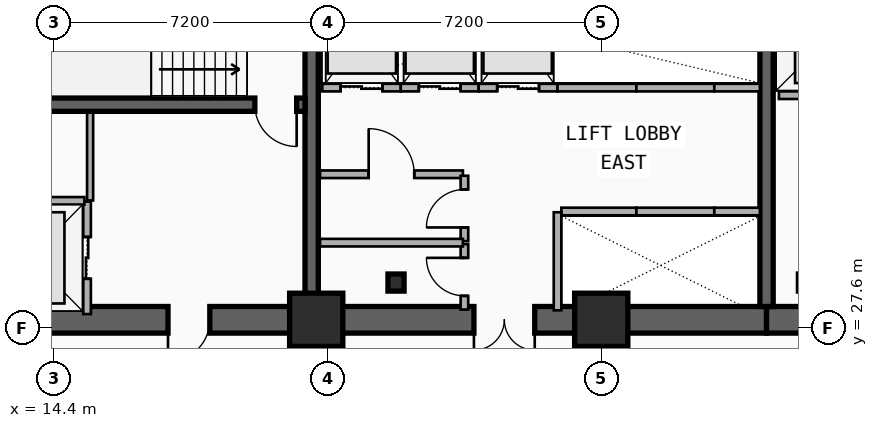
"""IFC4 building model, lengths in metres.
Left out: names, types, materials, properties, quantities, classifications, styles, units other than length and angle.
Written with IfcOpenShell. Run it as: python <this file> out.ifc"""

import sys

from ifc_helpers import new_model, si_unit, direction, frame, frame_2d, origin, origin_2d, place, context, subcontext, project, spatial, rectangle, i_section, extrude, element, fill, save


model = new_model("IFC4")
c1 = context("Model", 3, precision=1e-05, world=origin(), true_north=direction((0.0, 1.0)))
c2 = subcontext(c1, "Body", "Model", "MODEL_VIEW")
j1 = project(units=[si_unit("LENGTHUNIT", "METRE"), si_unit("PLANEANGLEUNIT", "RADIAN")], contexts=[c1])
p1 = place(None, origin())
s1 = spatial("IfcSite", under=j1, at=p1, CompositionType="ELEMENT")
p2 = place(p1, origin())
s2 = spatial("IfcBuilding", under=s1, at=p2, CompositionType="ELEMENT")
p3 = place(p2, frame((0.0, 0.0, 46.5)))
s3 = spatial("IfcBuildingStorey", under=s2, at=p3, CompositionType="ELEMENT", Elevation=46.5)
p4 = place(p3, frame((21.18, 27.82, 0.0), z_axis=(0.0, 0.0, 1.0), x_axis=(-1.0, 0.0, 0.0)))
e1 = element("IfcWall", 1, at=p4, inside=s3, PredefinedType="SHEAR", context=c2, shape_type="SweptSolid", body=[
    extrude(rectangle(XDim=9.03, YDim=0.7, at=frame_2d((4.515, 0.0))), origin(), (0.0, 0.0, 1.0), 3.5),
])
p5 = place(p4, frame((2.68, 0.0, 0.0)))
e2 = element("IfcOpeningElement", 2, at=p5, cuts=e1, PredefinedType="OPENING", context=c2, shape_type="SweptSolid", body=[
    extrude(rectangle(XDim=1.1, YDim=2.15, at=frame_2d((0.55, 1.075))), frame((0.0, 0.36, 0.0), z_axis=(0.0, -1.0, 0.0), x_axis=(1.0, 0.0, 0.0)), (0.0, 0.0, 1.0), 0.72),
])
p6 = place(p3, frame((33.15, 27.82, 0.0), z_axis=(0.0, 0.0, 1.0), x_axis=(-1.0, 0.0, 0.0)))
e3 = element("IfcWall", 3, at=p6, inside=s3, PredefinedType="SHEAR", context=c2, shape_type="SweptSolid", body=[
    extrude(rectangle(XDim=11.97, YDim=0.7, at=frame_2d((5.985, 0.0))), origin(), (0.0, 0.0, 1.0), 3.5),
])
p7 = place(p6, frame((6.1, 0.0, 0.0)))
e4 = element("IfcOpeningElement", 4, at=p7, cuts=e3, PredefinedType="OPENING", context=c2, shape_type="SweptSolid", body=[
    extrude(rectangle(XDim=1.6, YDim=2.2, at=frame_2d((0.8, 1.1))), frame((0.0, 0.36, 0.0), z_axis=(0.0, -1.0, 0.0), x_axis=(1.0, 0.0, 0.0)), (0.0, 0.0, 1.0), 0.72),
])
p8 = place(p3, frame((45.38, 27.82, 0.0), z_axis=(0.0, 0.0, 1.0), x_axis=(-1.0, 0.0, 0.0)))
e5 = element("IfcWall", 5, at=p8, inside=s3, PredefinedType="SHEAR", context=c2, shape_type="SweptSolid", body=[
    extrude(rectangle(XDim=12.23, YDim=0.7, at=frame_2d((6.115, 0.0))), origin(), (0.0, 0.0, 1.0), 3.5),
])
p9 = place(p8, frame((9.93, 0.0, 0.0)))
e6 = element("IfcOpeningElement", 6, at=p9, cuts=e5, PredefinedType="OPENING", context=c2, shape_type="SweptSolid", body=[
    extrude(rectangle(XDim=1.1, YDim=2.15, at=frame_2d((0.55, 1.075))), frame((0.0, 0.36, 0.0), z_axis=(0.0, -1.0, 0.0), x_axis=(1.0, 0.0, 0.0)), (0.0, 0.0, 1.0), 0.72),
])
p10 = place(p8, frame((6.23, 0.0, 0.0)))
e7 = element("IfcOpeningElement", 7, at=p10, cuts=e5, PredefinedType="OPENING", context=c2, shape_type="SweptSolid", body=[
    extrude(rectangle(XDim=1.1, YDim=2.15, at=frame_2d((0.55, 1.075))), frame((0.0, 0.36, 0.0), z_axis=(0.0, -1.0, 0.0), x_axis=(1.0, 0.0, 0.0)), (0.0, 0.0, 1.0), 0.72),
])
for number, where, z_axis, x_axis in (
    (8, (21.18, 28.17, 0.0), (0.0, 0.0, 1.0), (0.0, 1.0, 0.0)),
    (9, (33.15, 28.17, 0.0), (0.0, 0.0, 1.0), (0.0, 1.0, 0.0)),
):
    element("IfcWall", number, at=place(p3, frame(where, z_axis=z_axis, x_axis=x_axis)), inside=s3, PredefinedType="SHEAR", context=c2, shape_type="SweptSolid", body=[
        extrude(rectangle(XDim=8.53, YDim=0.35, at=frame_2d((4.265, 0.0))), origin(), (0.0, 0.0, 1.0), 3.5),
    ])
p11 = place(p3, frame((21.005, 33.48, 0.0), z_axis=(0.0, 0.0, 1.0), x_axis=(-1.0, 0.0, 0.0)))
e10 = element("IfcWall", 10, at=p11, inside=s3, PredefinedType="SHEAR", context=c2, shape_type="SweptSolid", body=[
    extrude(rectangle(XDim=8.505, YDim=0.35, at=frame_2d((4.252, 0.0))), origin(), (0.0, 0.0, 1.0), 3.5),
])
p12 = place(p11, frame((0.22, 0.0, 0.0)))
e11 = element("IfcOpeningElement", 11, at=p12, cuts=e10, PredefinedType="OPENING", context=c2, shape_type="SweptSolid", body=[
    extrude(rectangle(XDim=1.1, YDim=2.15, at=frame_2d((0.55, 1.075))), frame((0.0, 0.185, 0.0), z_axis=(0.0, -1.0, 0.0), x_axis=(1.0, 0.0, 0.0)), (0.0, 0.0, 1.0), 0.37),
])
p13 = place(p3, frame((23.4, 28.8, 0.0), z_axis=(0.0, 0.0, 1.0), x_axis=(1.0, 0.0, 0.0)))
e12 = element("IfcColumn", 12, at=p13, inside=s3, PredefinedType="COLUMN", context=c2, shape_type="SweptSolid", body=[
    extrude(i_section(OverallWidth=0.424, OverallDepth=0.45, WebThickness=0.041, FlangeThickness=0.065, FilletRadius=0.015, at=origin_2d()), origin(), (0.0, 0.0, 1.0), 3.5),
])
for number, where, z_axis, x_axis in (
    (13, (21.3, 27.82, 0.0), (0.0, 0.0, 1.0), (1.0, 0.0, 0.0)),
    (14, (28.8, 27.82, 0.0), (0.0, 0.0, 1.0), (1.0, 0.0, 0.0)),
):
    element("IfcColumn", number, at=place(p3, frame(where, z_axis=z_axis, x_axis=x_axis)), inside=s3, PredefinedType="COLUMN", context=c2, shape_type="SweptSolid", body=[
        extrude(rectangle(XDim=1.4, YDim=1.4, at=origin_2d()), origin(), (0.0, 0.0, 1.0), 3.5),
    ])
p14 = place(p3, frame((15.27, 27.97, 0.0), z_axis=(0.0, 0.0, 1.0), x_axis=(0.0, 1.0, 0.0)))
e15 = element("IfcWall", 15, at=p14, inside=s3, PredefinedType="PARTITIONING", context=c2, shape_type="SweptSolid", body=[
    extrude(rectangle(XDim=2.96, YDim=0.2, at=frame_2d((1.48, 0.0))), origin(), (0.0, 0.0, 1.0), 2.212),
])
p15 = place(p14, frame((0.93, 0.0, 0.0)))
e16 = element("IfcOpeningElement", 16, at=p15, cuts=e15, PredefinedType="OPENING", context=c2, shape_type="SweptSolid", body=[
    extrude(rectangle(XDim=1.1, YDim=2.15, at=frame_2d((0.55, 1.075))), frame((0.0, 0.11, 0.0), z_axis=(0.0, -1.0, 0.0), x_axis=(1.0, 0.0, 0.0)), (0.0, 0.0, 1.0), 0.22),
])
p16 = place(p3, frame((12.45, 30.95, 0.0), z_axis=(0.0, 0.0, 1.0), x_axis=(1.0, 0.0, 0.0)))
e17 = element("IfcWall", 17, at=p16, inside=s3, PredefinedType="PARTITIONING", context=c2, shape_type="SweptSolid", body=[
    extrude(rectangle(XDim=2.75, YDim=0.2, at=frame_2d((1.375, 0.0))), origin(), (0.0, 0.0, 1.0), 2.212),
])
p17 = place(p3, frame((33.475, 33.73, 0.0), z_axis=(0.0, 0.0, 1.0), x_axis=(1.0, 0.0, 0.0)))
e18 = element("IfcWall", 18, at=p17, inside=s3, PredefinedType="PARTITIONING", context=c2, shape_type="SweptSolid", body=[
    extrude(rectangle(XDim=2.725, YDim=0.2, at=frame_2d((1.362, 0.0))), origin(), (0.0, 0.0, 1.0), 2.212),
])
p18 = place(p17, frame((0.812, 0.0, 0.0)))
e19 = element("IfcOpeningElement", 19, at=p18, cuts=e18, PredefinedType="OPENING", context=c2, shape_type="SweptSolid", body=[
    extrude(rectangle(XDim=1.1, YDim=2.15, at=frame_2d((0.55, 1.075))), frame((0.0, 0.11, 0.0), z_axis=(0.0, -1.0, 0.0), x_axis=(1.0, 0.0, 0.0)), (0.0, 0.0, 1.0), 0.22),
])
p19 = place(p3, frame((27.75, 30.67, 0.0), z_axis=(0.0, 0.0, 1.0), x_axis=(1.0, 0.0, 0.0)))
e20 = element("IfcWall", 20, at=p19, inside=s3, PredefinedType="PARTITIONING", context=c2, shape_type="SweptSolid", body=[
    extrude(rectangle(XDim=1.975, YDim=0.2, at=frame_2d((0.988, 0.0))), origin(), (0.0, 0.0, 1.0), 2.212),
])
p20 = place(p3, frame((27.65, 28.07, 0.0), z_axis=(0.0, 0.0, 1.0), x_axis=(0.0, 1.0, 0.0)))
e21 = element("IfcWall", 21, at=p20, inside=s3, PredefinedType="PARTITIONING", context=c2, shape_type="SweptSolid", body=[
    extrude(rectangle(XDim=2.58, YDim=0.2, at=frame_2d((1.29, 0.0))), origin(), (0.0, 0.0, 1.0), 2.212),
])
p21 = place(p3, frame((29.725, 30.67, 0.0), z_axis=(0.0, 0.0, 1.0), x_axis=(1.0, 0.0, 0.0)))
e22 = element("IfcWall", 22, at=p21, inside=s3, PredefinedType="PARTITIONING", context=c2, shape_type="SweptSolid", body=[
    extrude(rectangle(XDim=2.05, YDim=0.2, at=frame_2d((1.025, 0.0))), origin(), (0.0, 0.0, 1.0), 2.62),
])
p22 = place(p3, frame((31.775, 30.67, 0.0), z_axis=(0.0, 0.0, 1.0), x_axis=(1.0, 0.0, 0.0)))
e23 = element("IfcWall", 23, at=p22, inside=s3, PredefinedType="PARTITIONING", context=c2, shape_type="SweptSolid", body=[
    extrude(rectangle(XDim=1.2, YDim=0.2, at=frame_2d((0.6, 0.0))), origin(), (0.0, 0.0, 1.0), 2.62),
])
p23 = place(p3, frame((21.46, 33.93, 0.0), z_axis=(0.0, 0.0, 1.0), x_axis=(1.0, 0.0, 0.0)))
e24 = element("IfcWall", 24, at=p23, inside=s3, PredefinedType="PARTITIONING", context=c2, shape_type="SweptSolid", body=[
    extrude(rectangle(XDim=2.065, YDim=0.2, at=frame_2d((1.032, 0.0))), origin(), (0.0, 0.0, 1.0), 2.212),
])
p24 = place(p23, frame((0.482, 0.0, 0.0)))
e25 = element("IfcOpeningElement", 25, at=p24, cuts=e24, PredefinedType="OPENING", context=c2, shape_type="SweptSolid", body=[
    extrude(rectangle(XDim=1.1, YDim=2.15, at=frame_2d((0.55, 1.075))), frame((0.0, 0.11, 0.0), z_axis=(0.0, -1.0, 0.0), x_axis=(1.0, 0.0, 0.0)), (0.0, 0.0, 1.0), 0.22),
])
p25 = place(p3, frame((23.525, 33.93, 0.0), z_axis=(0.0, 0.0, 1.0), x_axis=(1.0, 0.0, 0.0)))
e26 = element("IfcWall", 26, at=p25, inside=s3, PredefinedType="PARTITIONING", context=c2, shape_type="SweptSolid", body=[
    extrude(rectangle(XDim=2.05, YDim=0.2, at=frame_2d((1.025, 0.0))), origin(), (0.0, 0.0, 1.0), 3.24),
])
p26 = place(p25, frame((0.475, 0.0, 0.0)))
e27 = element("IfcOpeningElement", 27, at=p26, cuts=e26, PredefinedType="OPENING", context=c2, shape_type="SweptSolid", body=[
    extrude(rectangle(XDim=1.1, YDim=2.15, at=frame_2d((0.55, 1.075))), frame((0.0, 0.11, 0.0), z_axis=(0.0, -1.0, 0.0), x_axis=(1.0, 0.0, 0.0)), (0.0, 0.0, 1.0), 0.22),
])
p27 = place(p3, frame((25.575, 33.93, 0.0), z_axis=(0.0, 0.0, 1.0), x_axis=(1.0, 0.0, 0.0)))
e28 = element("IfcWall", 28, at=p27, inside=s3, PredefinedType="PARTITIONING", context=c2, shape_type="SweptSolid", body=[
    extrude(rectangle(XDim=2.075, YDim=0.2, at=frame_2d((1.038, 0.0))), origin(), (0.0, 0.0, 1.0), 3.24),
])
p28 = place(p27, frame((0.488, 0.0, 0.0)))
e29 = element("IfcOpeningElement", 29, at=p28, cuts=e28, PredefinedType="OPENING", context=c2, shape_type="SweptSolid", body=[
    extrude(rectangle(XDim=1.1, YDim=2.15, at=frame_2d((0.55, 1.075))), frame((0.0, 0.11, 0.0), z_axis=(0.0, -1.0, 0.0), x_axis=(1.0, 0.0, 0.0)), (0.0, 0.0, 1.0), 0.22),
])
p29 = place(p3, frame((27.65, 33.93, 0.0), z_axis=(0.0, 0.0, 1.0), x_axis=(1.0, 0.0, 0.0)))
e30 = element("IfcWall", 30, at=p29, inside=s3, PredefinedType="PARTITIONING", context=c2, shape_type="SweptSolid", body=[
    extrude(rectangle(XDim=2.075, YDim=0.2, at=frame_2d((1.038, 0.0))), origin(), (0.0, 0.0, 1.0), 2.212),
])
p30 = place(p3, frame((29.725, 33.93, 0.0), z_axis=(0.0, 0.0, 1.0), x_axis=(1.0, 0.0, 0.0)))
e31 = element("IfcWall", 31, at=p30, inside=s3, PredefinedType="PARTITIONING", context=c2, shape_type="SweptSolid", body=[
    extrude(rectangle(XDim=2.05, YDim=0.2, at=frame_2d((1.025, 0.0))), origin(), (0.0, 0.0, 1.0), 3.24),
])
p31 = place(p3, frame((31.775, 33.93, 0.0), z_axis=(0.0, 0.0, 1.0), x_axis=(1.0, 0.0, 0.0)))
e32 = element("IfcWall", 32, at=p31, inside=s3, PredefinedType="PARTITIONING", context=c2, shape_type="SweptSolid", body=[
    extrude(rectangle(XDim=1.2, YDim=0.2, at=frame_2d((0.6, 0.0))), origin(), (0.0, 0.0, 1.0), 3.24),
])
p32 = place(p3, frame((21.4, 31.65, 0.0), z_axis=(0.0, 0.0, 1.0), x_axis=(1.0, 0.0, 0.0)))
e33 = element("IfcWall", 33, at=p32, inside=s3, PredefinedType="PARTITIONING", context=c2, shape_type="SweptSolid", body=[
    extrude(rectangle(XDim=3.76, YDim=0.2, at=frame_2d((1.88, 0.0))), origin(), (0.0, 0.0, 1.0), 2.28),
])
p33 = place(p32, frame((1.28, 0.0, 0.0)))
e34 = element("IfcOpeningElement", 34, at=p33, cuts=e33, PredefinedType="OPENING", context=c2, shape_type="SweptSolid", body=[
    extrude(rectangle(XDim=1.2, YDim=2.15, at=frame_2d((0.6, 1.075))), frame((0.0, 0.11, 0.0), z_axis=(0.0, -1.0, 0.0), x_axis=(1.0, 0.0, 0.0)), (0.0, 0.0, 1.0), 0.22),
])
p34 = place(p3, frame((25.2, 28.09, 0.0), z_axis=(0.0, 0.0, 1.0), x_axis=(0.0, 1.0, 0.0)))
e35 = element("IfcWall", 35, at=p34, inside=s3, PredefinedType="PARTITIONING", context=c2, shape_type="SweptSolid", body=[
    extrude(rectangle(XDim=1.72, YDim=0.2, at=frame_2d((0.86, 0.0))), origin(), (0.0, 0.0, 1.0), 2.62),
])
p35 = place(p34, frame((0.36, 0.0, 0.0)))
e36 = element("IfcOpeningElement", 36, at=p35, cuts=e35, PredefinedType="OPENING", context=c2, shape_type="SweptSolid", body=[
    extrude(rectangle(XDim=1.0, YDim=2.15, at=frame_2d((0.5, 1.075))), frame((0.0, 0.11, 0.0), z_axis=(0.0, -1.0, 0.0), x_axis=(1.0, 0.0, 0.0)), (0.0, 0.0, 1.0), 0.22),
])
p36 = place(p3, frame((25.2, 29.89, 0.0), z_axis=(0.0, 0.0, 1.0), x_axis=(0.0, 1.0, 0.0)))
e37 = element("IfcWall", 37, at=p36, inside=s3, PredefinedType="PARTITIONING", context=c2, shape_type="SweptSolid", body=[
    extrude(rectangle(XDim=1.72, YDim=0.2, at=frame_2d((0.86, 0.0))), origin(), (0.0, 0.0, 1.0), 3.24),
])
p37 = place(p36, frame((0.36, 0.0, 0.0)))
e38 = element("IfcOpeningElement", 38, at=p37, cuts=e37, PredefinedType="OPENING", context=c2, shape_type="SweptSolid", body=[
    extrude(rectangle(XDim=1.0, YDim=2.15, at=frame_2d((0.5, 1.075))), frame((0.0, 0.11, 0.0), z_axis=(0.0, -1.0, 0.0), x_axis=(1.0, 0.0, 0.0)), (0.0, 0.0, 1.0), 0.22),
])
p38 = place(p3, frame((21.4, 29.85, 0.0), z_axis=(0.0, 0.0, 1.0), x_axis=(1.0, 0.0, 0.0)))
e39 = element("IfcWall", 39, at=p38, inside=s3, PredefinedType="PARTITIONING", context=c2, shape_type="SweptSolid", body=[
    extrude(rectangle(XDim=3.76, YDim=0.2, at=frame_2d((1.88, 0.0))), origin(), (0.0, 0.0, 1.0), 2.28),
])
p39 = place(p3, frame((15.35, 30.96, 0.0), z_axis=(0.0, 0.0, 1.0), x_axis=(0.0, 1.0, 0.0)))
e40 = element("IfcWall", 40, at=p39, inside=s3, PredefinedType="PARTITIONING", context=c2, shape_type="SweptSolid", body=[
    extrude(rectangle(XDim=2.31, YDim=0.16, at=frame_2d((1.155, 0.0))), origin(), (0.0, 0.0, 1.0), 3.24),
])
p40 = place(p15, origin())
e41 = element("IfcDoor", 41, at=p40, inside=s3, OperationType="DOUBLE_DOOR_SLIDING", PredefinedType="DOOR", context=c2, shape_type="SweptSolid", body=[
    extrude(rectangle(XDim=1.1, YDim=2.15, at=frame_2d((0.55, 1.075))), frame((0.0, 0.025, 0.0), z_axis=(0.0, -1.0, 0.0), x_axis=(1.0, 0.0, 0.0)), (0.0, 0.0, 1.0), 0.05),
])
fill(e16, e41)
p41 = place(p24, origin())
e42 = element("IfcDoor", 42, at=p41, inside=s3, OperationType="DOUBLE_DOOR_SLIDING", PredefinedType="DOOR", context=c2, shape_type="SweptSolid", body=[
    extrude(rectangle(XDim=1.1, YDim=2.15, at=frame_2d((0.55, 1.075))), frame((0.0, 0.025, 0.0), z_axis=(0.0, -1.0, 0.0), x_axis=(1.0, 0.0, 0.0)), (0.0, 0.0, 1.0), 0.05),
])
fill(e25, e42)
p42 = place(p26, origin())
e43 = element("IfcDoor", 43, at=p42, inside=s3, OperationType="DOUBLE_DOOR_SLIDING", PredefinedType="DOOR", context=c2, shape_type="SweptSolid", body=[
    extrude(rectangle(XDim=1.1, YDim=2.15, at=frame_2d((0.55, 1.075))), frame((0.0, 0.025, 0.0), z_axis=(0.0, -1.0, 0.0), x_axis=(1.0, 0.0, 0.0)), (0.0, 0.0, 1.0), 0.05),
])
fill(e27, e43)
p43 = place(p28, origin())
e44 = element("IfcDoor", 44, at=p43, inside=s3, OperationType="DOUBLE_DOOR_SLIDING", PredefinedType="DOOR", context=c2, shape_type="SweptSolid", body=[
    extrude(rectangle(XDim=1.1, YDim=2.15, at=frame_2d((0.55, 1.075))), frame((0.0, 0.025, 0.0), z_axis=(0.0, -1.0, 0.0), x_axis=(1.0, 0.0, 0.0)), (0.0, 0.0, 1.0), 0.05),
])
fill(e29, e44)
p44 = place(p12, origin())
e45 = element("IfcDoor", 45, at=p44, inside=s3, OperationType="SINGLE_SWING_LEFT", PredefinedType="DOOR", context=c2, shape_type="SweptSolid", body=[
    extrude(rectangle(XDim=1.1, YDim=2.15, at=frame_2d((0.55, 1.075))), frame((0.0, 0.025, 0.0), z_axis=(0.0, -1.0, 0.0), x_axis=(1.0, 0.0, 0.0)), (0.0, 0.0, 1.0), 0.05),
])
fill(e11, e45)
p45 = place(p5, origin())
e46 = element("IfcDoor", 46, at=p45, inside=s3, OperationType="SINGLE_SWING_RIGHT", PredefinedType="DOOR", context=c2, shape_type="SweptSolid", body=[
    extrude(rectangle(XDim=1.1, YDim=2.15, at=frame_2d((0.55, 1.075))), frame((0.0, 0.025, 0.0), z_axis=(0.0, -1.0, 0.0), x_axis=(1.0, 0.0, 0.0)), (0.0, 0.0, 1.0), 0.05),
])
fill(e2, e46)
p46 = place(p7, origin())
e47 = element("IfcDoor", 47, at=p46, inside=s3, OperationType="SINGLE_SWING_LEFT", PredefinedType="DOOR", context=c2, shape_type="SweptSolid", body=[
    extrude(rectangle(XDim=1.6, YDim=2.2, at=frame_2d((0.8, 1.1))), frame((0.0, 0.025, 0.0), z_axis=(0.0, -1.0, 0.0), x_axis=(1.0, 0.0, 0.0)), (0.0, 0.0, 1.0), 0.05),
])
fill(e4, e47)
p47 = place(p33, origin())
e48 = element("IfcDoor", 48, at=p47, inside=s3, OperationType="SINGLE_SWING_LEFT", PredefinedType="DOOR", context=c2, shape_type="SweptSolid", body=[
    extrude(rectangle(XDim=1.2, YDim=2.15, at=frame_2d((0.6, 1.075))), frame((0.0, 0.025, 0.0), z_axis=(0.0, -1.0, 0.0), x_axis=(1.0, 0.0, 0.0)), (0.0, 0.0, 1.0), 0.05),
])
fill(e34, e48)
p48 = place(p35, origin())
e49 = element("IfcDoor", 49, at=p48, inside=s3, OperationType="SINGLE_SWING_RIGHT", PredefinedType="DOOR", context=c2, shape_type="SweptSolid", body=[
    extrude(rectangle(XDim=1.0, YDim=2.15, at=frame_2d((0.5, 1.075))), frame((0.0, 0.025, 0.0), z_axis=(0.0, -1.0, 0.0), x_axis=(1.0, 0.0, 0.0)), (0.0, 0.0, 1.0), 0.05),
])
fill(e36, e49)
p49 = place(p37, origin())
e50 = element("IfcDoor", 50, at=p49, inside=s3, OperationType="SINGLE_SWING_LEFT", PredefinedType="DOOR", context=c2, shape_type="SweptSolid", body=[
    extrude(rectangle(XDim=1.0, YDim=2.15, at=frame_2d((0.5, 1.075))), frame((0.0, 0.025, 0.0), z_axis=(0.0, -1.0, 0.0), x_axis=(1.0, 0.0, 0.0)), (0.0, 0.0, 1.0), 0.05),
])
fill(e38, e50)
save(model, sys.argv[1])
